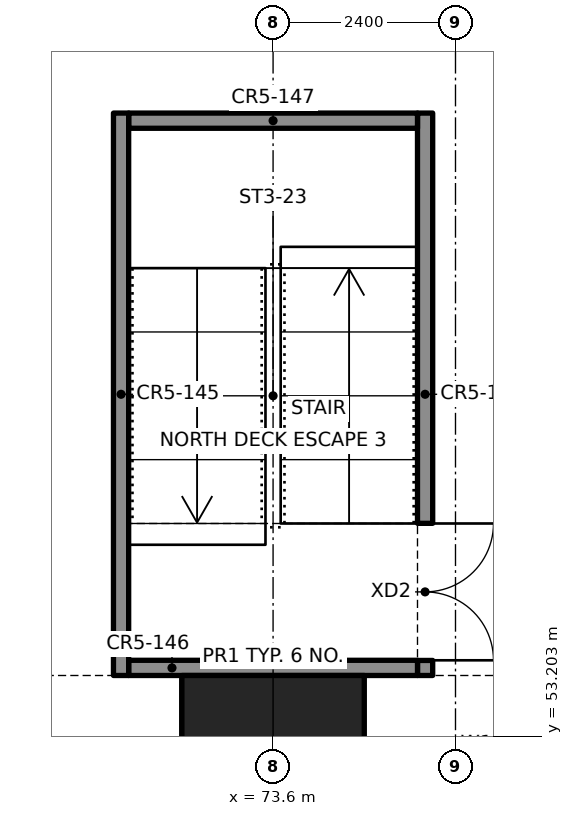
"""IFC4 building model, lengths in metres.
Left out: names, types, materials, properties, quantities, classifications, styles, units other than length and angle.
Written with IfcOpenShell. Run it as: python <this file> out.ifc"""

import sys

from ifc_helpers import new_model, si_unit, direction, frame, frame_2d, origin, origin_2d, place, context, subcontext, project, spatial, rectangle, extrude, element, fill, save


model = new_model("IFC4")
c1 = context("Model", 3, precision=1e-05, world=origin(), true_north=direction((0.0, 1.0)))
c2 = subcontext(c1, "Body", "Model", "MODEL_VIEW")
j1 = project(units=[si_unit("LENGTHUNIT", "METRE"), si_unit("PLANEANGLEUNIT", "RADIAN")], contexts=[c1])
p1 = place(None, origin())
s1 = spatial("IfcSite", under=j1, at=p1, CompositionType="ELEMENT")
p2 = place(p1, origin())
s2 = spatial("IfcBuilding", under=s1, at=p2, CompositionType="ELEMENT")
p3 = place(p2, origin())
s3 = spatial("IfcBuildingStorey", under=s2, at=p3, CompositionType="ELEMENT", Elevation=0.0)
p4 = place(p3, frame((73.6, 52.8, -0.9), z_axis=(0.0, 0.0, 1.0), x_axis=(1.0, 0.0, 0.0)))
e1 = element("IfcColumn", 1, at=p4, inside=s3, PredefinedType="COLUMN", context=c2, shape_type="SweptSolid", body=[
    extrude(rectangle(XDim=2.4, YDim=2.4, at=origin_2d()), origin(), (0.0, 0.0, 1.0), 5.3),
])
p5 = place(p3, frame((71.6, 54.0, 0.0), z_axis=(0.0, 0.0, 1.0), x_axis=(0.0, 1.0, 0.0)))
e2 = element("IfcWall", 2, at=p5, inside=s3, PredefinedType="SOLIDWALL", context=c2, shape_type="SweptSolid", body=[
    extrude(rectangle(XDim=7.4, YDim=0.2, at=frame_2d((3.7, 0.0))), origin(), (0.0, 0.0, 1.0), 4.4),
])
p6 = place(p3, frame((75.6, 61.4, 0.0), z_axis=(0.0, 0.0, 1.0), x_axis=(0.0, -1.0, 0.0)))
e3 = element("IfcWall", 3, at=p6, inside=s3, PredefinedType="SOLIDWALL", context=c2, shape_type="SweptSolid", body=[
    extrude(rectangle(XDim=7.4, YDim=0.2, at=frame_2d((3.7, 0.0))), origin(), (0.0, 0.0, 1.0), 4.4),
])
p7 = place(p6, frame((5.4, 0.0, 0.0)))
e4 = element("IfcOpeningElement", 4, at=p7, cuts=e3, PredefinedType="OPENING", context=c2, shape_type="SweptSolid", body=[
    extrude(rectangle(XDim=1.8, YDim=2.1, at=frame_2d((0.9, 1.05))), frame((0.0, 0.11, 0.0), z_axis=(0.0, -1.0, 0.0), x_axis=(1.0, 0.0, 0.0)), (0.0, 0.0, 1.0), 0.22),
])
for number, where, z_axis, x_axis in (
    (5, (71.7, 54.1, 0.0), (0.0, 0.0, 1.0), (1.0, 0.0, 0.0)),
    (6, (71.7, 61.3, 0.0), (0.0, 0.0, 1.0), (1.0, 0.0, 0.0)),
):
    element("IfcWall", number, at=place(p3, frame(where, z_axis=z_axis, x_axis=x_axis)), inside=s3, PredefinedType="SOLIDWALL", context=c2, shape_type="SweptSolid", body=[
        extrude(rectangle(XDim=3.8, YDim=0.2, at=frame_2d((1.9, 0.0))), origin(), (0.0, 0.0, 1.0), 4.4),
    ])
p8 = place(p3, frame((72.5, 41.5, 0.0), z_axis=(0.0, 0.0, 1.0), x_axis=(0.0, 1.0, 0.0)))
e7 = element("IfcWall", 7, at=p8, inside=s3, PredefinedType="PARTITIONING", context=c2, shape_type="SweptSolid", body=[
    extrude(rectangle(XDim=12.45, YDim=0.2, at=frame_2d((6.225, 0.0))), origin(), (0.0, 0.0, 1.0), 3.65),
])
p9 = place(p7, origin())
e8 = element("IfcDoor", 8, at=p9, inside=s3, OperationType="DOUBLE_DOOR_SINGLE_SWING", PredefinedType="DOOR", context=c2, shape_type="SweptSolid", body=[
    extrude(rectangle(XDim=1.8, YDim=2.1, at=frame_2d((0.9, 1.05))), frame((0.0, 0.025, 0.0), z_axis=(0.0, -1.0, 0.0), x_axis=(1.0, 0.0, 0.0)), (0.0, 0.0, 1.0), 0.05),
])
fill(e4, e8)
save(model, sys.argv[1])
